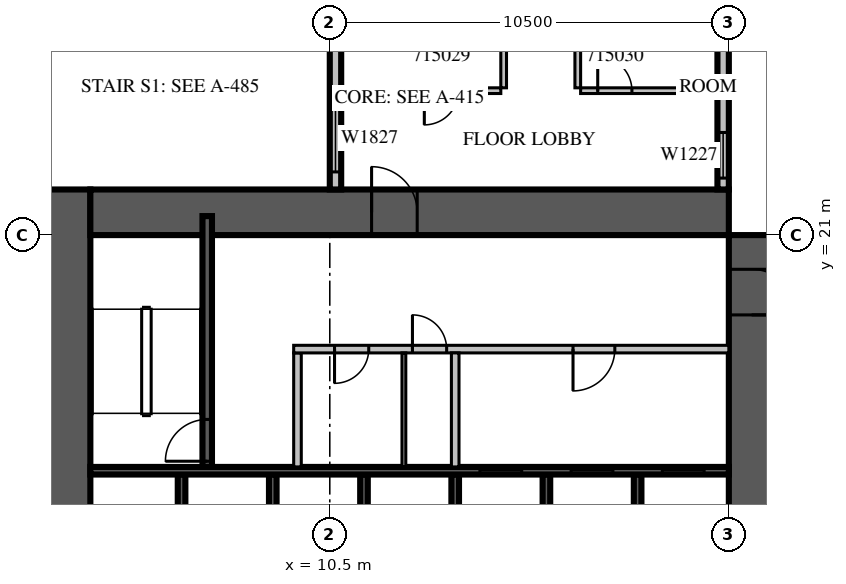
"""IFC4 building model, lengths in metres.
Left out: names, types, materials, properties, quantities, classifications, styles, units other than length and angle.
Written with IfcOpenShell. Run it as: python <this file> out.ifc"""

import sys

from ifc_helpers import new_model, si_unit, direction, frame, frame_2d, origin, place, context, subcontext, project, spatial, rectangle, extrude, source, transform, mapped, element, fill, save


model = new_model("IFC4")
c1 = context("Model", 3, precision=1e-05, world=origin(), true_north=direction((0.0, 1.0)))
c2 = subcontext(c1, "Body", "Model", "MODEL_VIEW")
j1 = project(units=[si_unit("LENGTHUNIT", "METRE"), si_unit("PLANEANGLEUNIT", "RADIAN")], contexts=[c1])
p1 = place(None, origin())
s1 = spatial("IfcSite", under=j1, at=p1, CompositionType="ELEMENT")
p2 = place(p1, origin())
s2 = spatial("IfcBuilding", under=s1, at=p2, CompositionType="ELEMENT")
p3 = place(p2, frame((0.0, 0.0, 74.1)))
s3 = spatial("IfcBuildingStorey", under=s2, at=p3, CompositionType="ELEMENT", Elevation=74.1)
m1 = source(origin(), c2, "Body", "SweptSolid", [
    extrude(rectangle(XDim=18.0, YDim=1.2, at=frame_2d((9.0, 0.0))), origin(), (0.0, 0.0, 1.0), 4.2),
])
p4 = place(p3, frame((3.6, 4.2, 0.0), z_axis=(0.0, 0.0, 1.0), x_axis=(0.0, 1.0, 0.0)))
e1 = element("IfcWall", 1, at=p4, inside=s3, PredefinedType="SHEAR", context=c2, shape_type="MappedRepresentation", body=[
    mapped(m1, transform((0.0, 0.0, 0.0), scale=1.0)),
])
m2 = source(origin(), c2, "Body", "SweptSolid", [
    extrude(rectangle(XDim=2.2, YDim=2.1, at=frame_2d((1.1, 1.05))), frame((0.0, 0.61, 0.0), z_axis=(0.0, -1.0, 0.0), x_axis=(1.0, 0.0, 0.0)), (0.0, 0.0, 1.0), 1.22),
])
p5 = place(p4, frame((4.2, 0.0, 0.0)))
e2 = element("IfcOpeningElement", 2, at=p5, cuts=e1, PredefinedType="OPENING", context=c2, shape_type="MappedRepresentation", body=[
    mapped(m2, transform((0.0, 0.0, 0.0), scale=1.0)),
])
m3 = source(origin(), c2, "Body", "SweptSolid", [
    extrude(rectangle(XDim=16.8, YDim=1.2, at=frame_2d((8.4, 0.0))), origin(), (0.0, 0.0, 1.0), 4.2),
])
p6 = place(p3, frame((21.6, 4.2, 0.0), z_axis=(0.0, 0.0, 1.0), x_axis=(0.0, 1.0, 0.0)))
e3 = element("IfcWall", 3, at=p6, inside=s3, PredefinedType="SHEAR", context=c2, shape_type="MappedRepresentation", body=[
    mapped(m3, transform((0.0, 0.0, 0.0), scale=1.0)),
])
p7 = place(p6, frame((4.2, 0.0, 0.0)))
e4 = element("IfcOpeningElement", 4, at=p7, cuts=e3, PredefinedType="OPENING", context=c2, shape_type="MappedRepresentation", body=[
    mapped(m2, transform((0.0, 0.0, 0.0), scale=1.0)),
])
m4 = source(origin(), c2, "Body", "SweptSolid", [
    extrude(rectangle(XDim=1.2, YDim=2.1, at=frame_2d((0.6, 1.05))), frame((0.0, 0.61, 0.0), z_axis=(0.0, -1.0, 0.0), x_axis=(1.0, 0.0, 0.0)), (0.0, 0.0, 1.0), 1.22),
])
p8 = place(p6, frame((14.7, 0.0, 0.0)))
e5 = element("IfcOpeningElement", 5, at=p8, cuts=e3, PredefinedType="OPENING", context=c2, shape_type="MappedRepresentation", body=[
    mapped(m4, transform((0.0, 0.0, 0.0), scale=1.0)),
])
p9 = place(p3, frame((4.2, 21.6, 0.0), z_axis=(0.0, 0.0, 1.0), x_axis=(1.0, 0.0, 0.0)))
e6 = element("IfcWall", 6, at=p9, inside=s3, PredefinedType="SHEAR", context=c2, shape_type="MappedRepresentation", body=[
    mapped(m3, transform((0.0, 0.0, 0.0), scale=1.0)),
])
p10 = place(p9, frame((7.4, 0.0, 0.0)))
e7 = element("IfcOpeningElement", 7, at=p10, cuts=e6, PredefinedType="OPENING", context=c2, shape_type="MappedRepresentation", body=[
    mapped(m4, transform((0.0, 0.0, 0.0), scale=1.0)),
])
m5 = source(origin(), c2, "Body", "SweptSolid", [
    extrude(rectangle(XDim=6.6, YDim=0.3, at=frame_2d((3.3, 0.0))), origin(), (0.0, 0.0, 1.0), 3.8),
])
p11 = place(p3, frame((20.85, 22.2, 0.0), z_axis=(0.0, 0.0, 1.0), x_axis=(0.0, 1.0, 0.0)))
e8 = element("IfcWall", 8, at=p11, inside=s3, PredefinedType="STANDARD", context=c2, shape_type="MappedRepresentation", body=[
    mapped(m5, transform((0.0, 0.0, 0.0), scale=1.0)),
])
m6 = source(origin(), c2, "Body", "SweptSolid", [
    extrude(rectangle(XDim=1.2, YDim=2.7, at=frame_2d((0.6, 1.35))), frame((0.0, 0.16, 0.0), z_axis=(0.0, -1.0, 0.0), x_axis=(1.0, 0.0, 0.0)), (0.0, 0.0, 1.0), 0.32),
])
p12 = place(p11, frame((0.3, 0.0, 0.6)))
e9 = element("IfcOpeningElement", 9, at=p12, cuts=e8, PredefinedType="OPENING", context=c2, shape_type="MappedRepresentation", body=[
    mapped(m6, transform((0.0, 0.0, 0.0), scale=1.0)),
])
m7 = source(origin(), c2, "Body", "SweptSolid", [
    extrude(rectangle(XDim=2.4, YDim=2.7, at=frame_2d((1.2, 1.35))), frame((0.0, 0.16, 0.0), z_axis=(0.0, -1.0, 0.0), x_axis=(1.0, 0.0, 0.0)), (0.0, 0.0, 1.0), 0.32),
])
p13 = place(p11, frame((3.9, 0.0, 0.6)))
e10 = element("IfcOpeningElement", 10, at=p13, cuts=e8, PredefinedType="OPENING", context=c2, shape_type="MappedRepresentation", body=[
    mapped(m7, transform((0.0, 0.0, 0.0), scale=1.0)),
])
p14 = place(p3, frame((10.65, 28.8, 0.0), z_axis=(0.0, 0.0, 1.0), x_axis=(0.0, -1.0, 0.0)))
e11 = element("IfcWall", 11, at=p14, inside=s3, PredefinedType="STANDARD", context=c2, shape_type="MappedRepresentation", body=[
    mapped(m5, transform((0.0, 0.0, 0.0), scale=1.0)),
])
p15 = place(p14, frame((0.3, 0.0, 0.6)))
e12 = element("IfcOpeningElement", 12, at=p15, cuts=e11, PredefinedType="OPENING", context=c2, shape_type="MappedRepresentation", body=[
    mapped(m6, transform((0.0, 0.0, 0.0), scale=1.0)),
])
m8 = source(origin(), c2, "Body", "SweptSolid", [
    extrude(rectangle(XDim=1.8, YDim=2.7, at=frame_2d((0.9, 1.35))), frame((0.0, 0.16, 0.0), z_axis=(0.0, -1.0, 0.0), x_axis=(1.0, 0.0, 0.0)), (0.0, 0.0, 1.0), 0.32),
])
p16 = place(p14, frame((4.338, 0.0, 0.6)))
e13 = element("IfcOpeningElement", 13, at=p16, cuts=e11, PredefinedType="OPENING", context=c2, shape_type="MappedRepresentation", body=[
    mapped(m8, transform((0.0, 0.0, 0.0), scale=1.0)),
])
m9 = source(origin(), c2, "Body", "SweptSolid", [
    extrude(rectangle(XDim=3.0, YDim=0.2, at=frame_2d((1.5, 0.0))), origin(), (0.0, 0.0, 1.0), 4.2),
])
for number, where, z_axis, x_axis in (
    (14, (6.6, 11.7, 0.0), (0.0, 0.0, 1.0), (0.0, 1.0, 0.0)),
    (15, (9.0, 11.7, 0.0), (0.0, 0.0, 1.0), (0.0, 1.0, 0.0)),
    (16, (11.4, 11.7, 0.0), (0.0, 0.0, 1.0), (0.0, 1.0, 0.0)),
    (17, (13.8, 11.7, 0.0), (0.0, 0.0, 1.0), (0.0, 1.0, 0.0)),
    (18, (16.2, 11.7, 0.0), (0.0, 0.0, 1.0), (0.0, 1.0, 0.0)),
    (19, (18.6, 11.7, 0.0), (0.0, 0.0, 1.0), (0.0, 1.0, 0.0)),
):
    element("IfcWall", number, at=place(p3, frame(where, z_axis=z_axis, x_axis=x_axis)), inside=s3, PredefinedType="SOLIDWALL", context=c2, shape_type="MappedRepresentation", body=[
        mapped(m9, transform((0.0, 0.0, 0.0), scale=1.0)),
    ])
m10 = source(origin(), c2, "Body", "SweptSolid", [
    extrude(rectangle(XDim=16.8, YDim=0.2, at=frame_2d((8.4, 0.0))), origin(), (0.0, 0.0, 1.0), 4.2),
])
p17 = place(p3, frame((4.2, 14.8, 0.0), z_axis=(0.0, 0.0, 1.0), x_axis=(1.0, 0.0, 0.0)))
e20 = element("IfcWall", 20, at=p17, inside=s3, PredefinedType="SOLIDWALL", context=c2, shape_type="MappedRepresentation", body=[
    mapped(m10, transform((0.0, 0.0, 0.0), scale=1.0)),
])
m11 = source(origin(), c2, "Body", "SweptSolid", [
    extrude(rectangle(XDim=1.1, YDim=2.1, at=frame_2d((0.55, 1.05))), frame((0.0, 0.11, 0.0), z_axis=(0.0, -1.0, 0.0), x_axis=(1.0, 0.0, 0.0)), (0.0, 0.0, 1.0), 0.22),
])
p18 = place(p17, frame((10.25, 0.0, 0.0)))
e21 = element("IfcOpeningElement", 21, at=p18, cuts=e20, PredefinedType="OPENING", context=c2, shape_type="MappedRepresentation", body=[
    mapped(m11, transform((0.0, 0.0, 0.0), scale=1.0)),
])
p19 = place(p17, frame((12.65, 0.0, 0.0)))
e22 = element("IfcOpeningElement", 22, at=p19, cuts=e20, PredefinedType="OPENING", context=c2, shape_type="MappedRepresentation", body=[
    mapped(m11, transform((0.0, 0.0, 0.0), scale=1.0)),
])
p20 = place(p17, frame((15.05, 0.0, 0.0)))
e23 = element("IfcOpeningElement", 23, at=p20, cuts=e20, PredefinedType="OPENING", context=c2, shape_type="MappedRepresentation", body=[
    mapped(m11, transform((0.0, 0.0, 0.0), scale=1.0)),
])
m12 = source(origin(), c2, "Body", "SweptSolid", [
    extrude(rectangle(XDim=6.6, YDim=0.25, at=frame_2d((3.3, 0.0))), origin(), (0.0, 0.0, 1.0), 3.8),
])
p21 = place(p3, frame((7.275, 14.9, 0.0), z_axis=(0.0, 0.0, 1.0), x_axis=(0.0, 1.0, 0.0)))
e24 = element("IfcWall", 24, at=p21, inside=s3, PredefinedType="SOLIDWALL", context=c2, shape_type="MappedRepresentation", body=[
    mapped(m12, transform((0.0, 0.0, 0.0), scale=1.0)),
])
m13 = source(origin(), c2, "Body", "SweptSolid", [
    extrude(rectangle(XDim=1.1, YDim=2.1, at=frame_2d((0.55, 1.05))), frame((0.0, 0.135, 0.0), z_axis=(0.0, -1.0, 0.0), x_axis=(1.0, 0.0, 0.0)), (0.0, 0.0, 1.0), 0.27),
])
p22 = place(p21, frame((0.15, 0.0, 0.0)))
e25 = element("IfcOpeningElement", 25, at=p22, cuts=e24, PredefinedType="OPENING", context=c2, shape_type="MappedRepresentation", body=[
    mapped(m13, transform((0.0, 0.0, 0.0), scale=1.0)),
])
m14 = source(origin(), c2, "Body", "SweptSolid", [
    extrude(rectangle(XDim=3.0, YDim=0.2, at=frame_2d((1.5, 0.0))), origin(), (0.0, 0.0, 1.0), 3.8),
])
p23 = place(p3, frame((9.65, 14.9, 0.0), z_axis=(0.0, 0.0, 1.0), x_axis=(0.0, 1.0, 0.0)))
e26 = element("IfcWall", 26, at=p23, inside=s3, PredefinedType="PARTITIONING", context=c2, shape_type="MappedRepresentation", body=[
    mapped(m14, transform((0.0, 0.0, 0.0), scale=1.0)),
])
m15 = source(origin(), c2, "Body", "SweptSolid", [
    extrude(rectangle(XDim=11.45, YDim=0.2, at=frame_2d((5.725, 0.0))), origin(), (0.0, 0.0, 1.0), 3.8),
])
p24 = place(p3, frame((9.55, 18.0, 0.0), z_axis=(0.0, 0.0, 1.0), x_axis=(1.0, 0.0, 0.0)))
e27 = element("IfcWall", 27, at=p24, inside=s3, PredefinedType="PARTITIONING", context=c2, shape_type="MappedRepresentation", body=[
    mapped(m15, transform((0.0, 0.0, 0.0), scale=1.0)),
])
m16 = source(origin(), c2, "Body", "SweptSolid", [
    extrude(rectangle(XDim=0.9, YDim=2.1, at=frame_2d((0.45, 1.05))), frame((0.0, 0.11, 0.0), z_axis=(0.0, -1.0, 0.0), x_axis=(1.0, 0.0, 0.0)), (0.0, 0.0, 1.0), 0.22),
])
p25 = place(p24, frame((1.075, 0.0, 0.0)))
e28 = element("IfcOpeningElement", 28, at=p25, cuts=e27, PredefinedType="OPENING", context=c2, shape_type="MappedRepresentation", body=[
    mapped(m16, transform((0.0, 0.0, 0.0), scale=1.0)),
])
p26 = place(p24, frame((3.125, 0.0, 0.0)))
e29 = element("IfcOpeningElement", 29, at=p26, cuts=e27, PredefinedType="OPENING", context=c2, shape_type="MappedRepresentation", body=[
    mapped(m16, transform((0.0, 0.0, 0.0), scale=1.0)),
])
p27 = place(p24, frame((7.35, 0.0, 0.0)))
e30 = element("IfcOpeningElement", 30, at=p27, cuts=e27, PredefinedType="OPENING", context=c2, shape_type="MappedRepresentation", body=[
    mapped(m11, transform((0.0, 0.0, 0.0), scale=1.0)),
])
p28 = place(p3, frame((13.8, 14.9, 0.0), z_axis=(0.0, 0.0, 1.0), x_axis=(0.0, 1.0, 0.0)))
e31 = element("IfcWall", 31, at=p28, inside=s3, PredefinedType="PARTITIONING", context=c2, shape_type="MappedRepresentation", body=[
    mapped(m14, transform((0.0, 0.0, 0.0), scale=1.0)),
])
m17 = source(origin(), c2, "Body", "SweptSolid", [
    extrude(rectangle(XDim=3.0, YDim=0.1, at=frame_2d((1.5, 0.0))), origin(), (0.0, 0.0, 1.0), 3.8),
])
p29 = place(p3, frame((12.45, 14.9, 0.0), z_axis=(0.0, 0.0, 1.0), x_axis=(0.0, 1.0, 0.0)))
e32 = element("IfcWall", 32, at=p29, inside=s3, PredefinedType="PARTITIONING", context=c2, shape_type="MappedRepresentation", body=[
    mapped(m17, transform((0.0, 0.0, 0.0), scale=1.0)),
])
m18 = source(origin(), c2, "Body", "SweptSolid", [
    extrude(rectangle(XDim=4.295, YDim=0.15, at=frame_2d((2.147, 0.0))), origin(), (0.0, 0.0, 1.0), 3.8),
])
p30 = place(p3, frame((10.705, 24.8, 0.0), z_axis=(0.0, 0.0, 1.0), x_axis=(1.0, 0.0, 0.0)))
e33 = element("IfcWall", 33, at=p30, inside=s3, PredefinedType="PARTITIONING", context=c2, shape_type="MappedRepresentation", body=[
    mapped(m18, transform((0.0, 0.0, 0.0), scale=1.0)),
])
m19 = source(origin(), c2, "Body", "SweptSolid", [
    extrude(rectangle(XDim=0.9, YDim=2.1, at=frame_2d((0.45, 1.05))), frame((0.0, 0.085, 0.0), z_axis=(0.0, -1.0, 0.0), x_axis=(1.0, 0.0, 0.0)), (0.0, 0.0, 1.0), 0.17),
])
p31 = place(p30, frame((2.283, 0.0, 0.0)))
e34 = element("IfcOpeningElement", 34, at=p31, cuts=e33, PredefinedType="OPENING", context=c2, shape_type="MappedRepresentation", body=[
    mapped(m19, transform((0.0, 0.0, 0.0), scale=1.0)),
])
m20 = source(origin(), c2, "Body", "SweptSolid", [
    extrude(rectangle(XDim=3.6, YDim=0.15, at=frame_2d((1.8, 0.0))), origin(), (0.0, 0.0, 1.0), 3.8),
])
p32 = place(p3, frame((17.1, 24.8, 0.0), z_axis=(0.0, 0.0, 1.0), x_axis=(1.0, 0.0, 0.0)))
e35 = element("IfcWall", 35, at=p32, inside=s3, PredefinedType="PARTITIONING", context=c2, shape_type="MappedRepresentation", body=[
    mapped(m20, transform((0.0, 0.0, 0.0), scale=1.0)),
])
p33 = place(p32, frame((0.45, 0.0, 0.0)))
e36 = element("IfcOpeningElement", 36, at=p33, cuts=e35, PredefinedType="OPENING", context=c2, shape_type="MappedRepresentation", body=[
    mapped(m19, transform((0.0, 0.0, 0.0), scale=1.0)),
])
m21 = source(origin(), c2, "Body", "SweptSolid", [
    extrude(rectangle(XDim=4.45, YDim=0.15, at=frame_2d((2.225, 0.0))), origin(), (0.0, 0.0, 1.0), 3.8),
])
for number, where, z_axis, x_axis in (
    (37, (15.075, 24.875, 0.0), (0.0, 0.0, 1.0), (0.0, 1.0, 0.0)),
    (38, (17.025, 29.325, 0.0), (0.0, 0.0, 1.0), (0.0, -1.0, 0.0)),
):
    element("IfcWall", number, at=place(p3, frame(where, z_axis=z_axis, x_axis=x_axis)), inside=s3, PredefinedType="PARTITIONING", context=c2, shape_type="MappedRepresentation", body=[
        mapped(m21, transform((0.0, 0.0, 0.0), scale=1.0)),
    ])
m22 = source(origin(), c2, "Body", "SweptSolid", [
    extrude(rectangle(XDim=1.2, YDim=2.7, at=frame_2d((0.6, 1.35))), frame((0.0, 0.03, 0.0), z_axis=(0.0, -1.0, 0.0), x_axis=(1.0, 0.0, 0.0)), (0.0, 0.0, 1.0), 0.06),
])
p34 = place(p12, origin())
e39 = element("IfcWindow", 39, at=p34, inside=s3, PartitioningType="SINGLE_PANEL", PredefinedType="WINDOW", context=c2, shape_type="MappedRepresentation", body=[
    mapped(m22, transform((0.0, 0.0, 0.0), scale=1.0)),
])
fill(e9, e39)
m23 = source(origin(), c2, "Body", "SweptSolid", [
    extrude(rectangle(XDim=1.8, YDim=2.7, at=frame_2d((0.9, 1.35))), frame((0.0, 0.03, 0.0), z_axis=(0.0, -1.0, 0.0), x_axis=(1.0, 0.0, 0.0)), (0.0, 0.0, 1.0), 0.06),
])
p35 = place(p16, origin())
e40 = element("IfcWindow", 40, at=p35, inside=s3, PartitioningType="SINGLE_PANEL", PredefinedType="WINDOW", context=c2, shape_type="MappedRepresentation", body=[
    mapped(m23, transform((0.0, 0.0, 0.0), scale=1.0)),
])
fill(e13, e40)
m24 = source(origin(), c2, "Body", "SweptSolid", [
    extrude(rectangle(XDim=1.1, YDim=2.1, at=frame_2d((0.55, 1.05))), frame((0.0, 0.025, 0.0), z_axis=(0.0, -1.0, 0.0), x_axis=(1.0, 0.0, 0.0)), (0.0, 0.0, 1.0), 0.05),
])
p36 = place(p18, origin())
e41 = element("IfcDoor", 41, at=p36, inside=s3, OperationType="SLIDING_TO_LEFT", PredefinedType="DOOR", context=c2, shape_type="MappedRepresentation", body=[
    mapped(m24, transform((0.0, 0.0, 0.0), scale=1.0)),
])
fill(e21, e41)
p37 = place(p19, origin())
e42 = element("IfcDoor", 42, at=p37, inside=s3, OperationType="SLIDING_TO_LEFT", PredefinedType="DOOR", context=c2, shape_type="MappedRepresentation", body=[
    mapped(m24, transform((0.0, 0.0, 0.0), scale=1.0)),
])
fill(e22, e42)
p38 = place(p20, origin())
e43 = element("IfcDoor", 43, at=p38, inside=s3, OperationType="SLIDING_TO_LEFT", PredefinedType="DOOR", context=c2, shape_type="MappedRepresentation", body=[
    mapped(m24, transform((0.0, 0.0, 0.0), scale=1.0)),
])
fill(e23, e43)
p39 = place(p22, origin())
e44 = element("IfcDoor", 44, at=p39, inside=s3, OperationType="SINGLE_SWING_LEFT", PredefinedType="DOOR", context=c2, shape_type="MappedRepresentation", body=[
    mapped(m24, transform((0.0, 0.0, 0.0), scale=1.0)),
])
fill(e25, e44)
m25 = source(origin(), c2, "Body", "SweptSolid", [
    extrude(rectangle(XDim=0.9, YDim=2.1, at=frame_2d((0.45, 1.05))), frame((0.0, 0.025, 0.0), z_axis=(0.0, -1.0, 0.0), x_axis=(1.0, 0.0, 0.0)), (0.0, 0.0, 1.0), 0.05),
])
p40 = place(p25, origin())
e45 = element("IfcDoor", 45, at=p40, inside=s3, OperationType="SINGLE_SWING_RIGHT", PredefinedType="DOOR", context=c2, shape_type="MappedRepresentation", body=[
    mapped(m25, transform((0.0, 0.0, 0.0), scale=1.0)),
])
fill(e28, e45)
p41 = place(p26, origin())
e46 = element("IfcDoor", 46, at=p41, inside=s3, OperationType="SINGLE_SWING_LEFT", PredefinedType="DOOR", context=c2, shape_type="MappedRepresentation", body=[
    mapped(m25, transform((0.0, 0.0, 0.0), scale=1.0)),
])
fill(e29, e46)
p42 = place(p27, origin())
e47 = element("IfcDoor", 47, at=p42, inside=s3, OperationType="SINGLE_SWING_RIGHT", PredefinedType="DOOR", context=c2, shape_type="MappedRepresentation", body=[
    mapped(m24, transform((0.0, 0.0, 0.0), scale=1.0)),
])
fill(e30, e47)
m26 = source(origin(), c2, "Body", "SweptSolid", [
    extrude(rectangle(XDim=1.2, YDim=2.1, at=frame_2d((0.6, 1.05))), frame((0.0, 0.025, 0.0), z_axis=(0.0, -1.0, 0.0), x_axis=(1.0, 0.0, 0.0)), (0.0, 0.0, 1.0), 0.05),
])
p43 = place(p10, origin())
e48 = element("IfcDoor", 48, at=p43, inside=s3, OperationType="SINGLE_SWING_LEFT", PredefinedType="DOOR", context=c2, shape_type="MappedRepresentation", body=[
    mapped(m26, transform((0.0, 0.0, 0.0), scale=1.0)),
])
fill(e7, e48)
p44 = place(p8, origin())
e49 = element("IfcDoor", 49, at=p44, inside=s3, OperationType="SINGLE_SWING_RIGHT", PredefinedType="DOOR", context=c2, shape_type="MappedRepresentation", body=[
    mapped(m26, transform((0.0, 0.0, 0.0), scale=1.0)),
])
fill(e5, e49)
p45 = place(p31, origin())
e50 = element("IfcDoor", 50, at=p45, inside=s3, OperationType="SINGLE_SWING_RIGHT", PredefinedType="DOOR", context=c2, shape_type="MappedRepresentation", body=[
    mapped(m25, transform((0.0, 0.0, 0.0), scale=1.0)),
])
fill(e34, e50)
p46 = place(p33, origin())
e51 = element("IfcDoor", 51, at=p46, inside=s3, OperationType="SINGLE_SWING_LEFT", PredefinedType="DOOR", context=c2, shape_type="MappedRepresentation", body=[
    mapped(m25, transform((0.0, 0.0, 0.0), scale=1.0)),
])
fill(e36, e51)
save(model, sys.argv[1])
